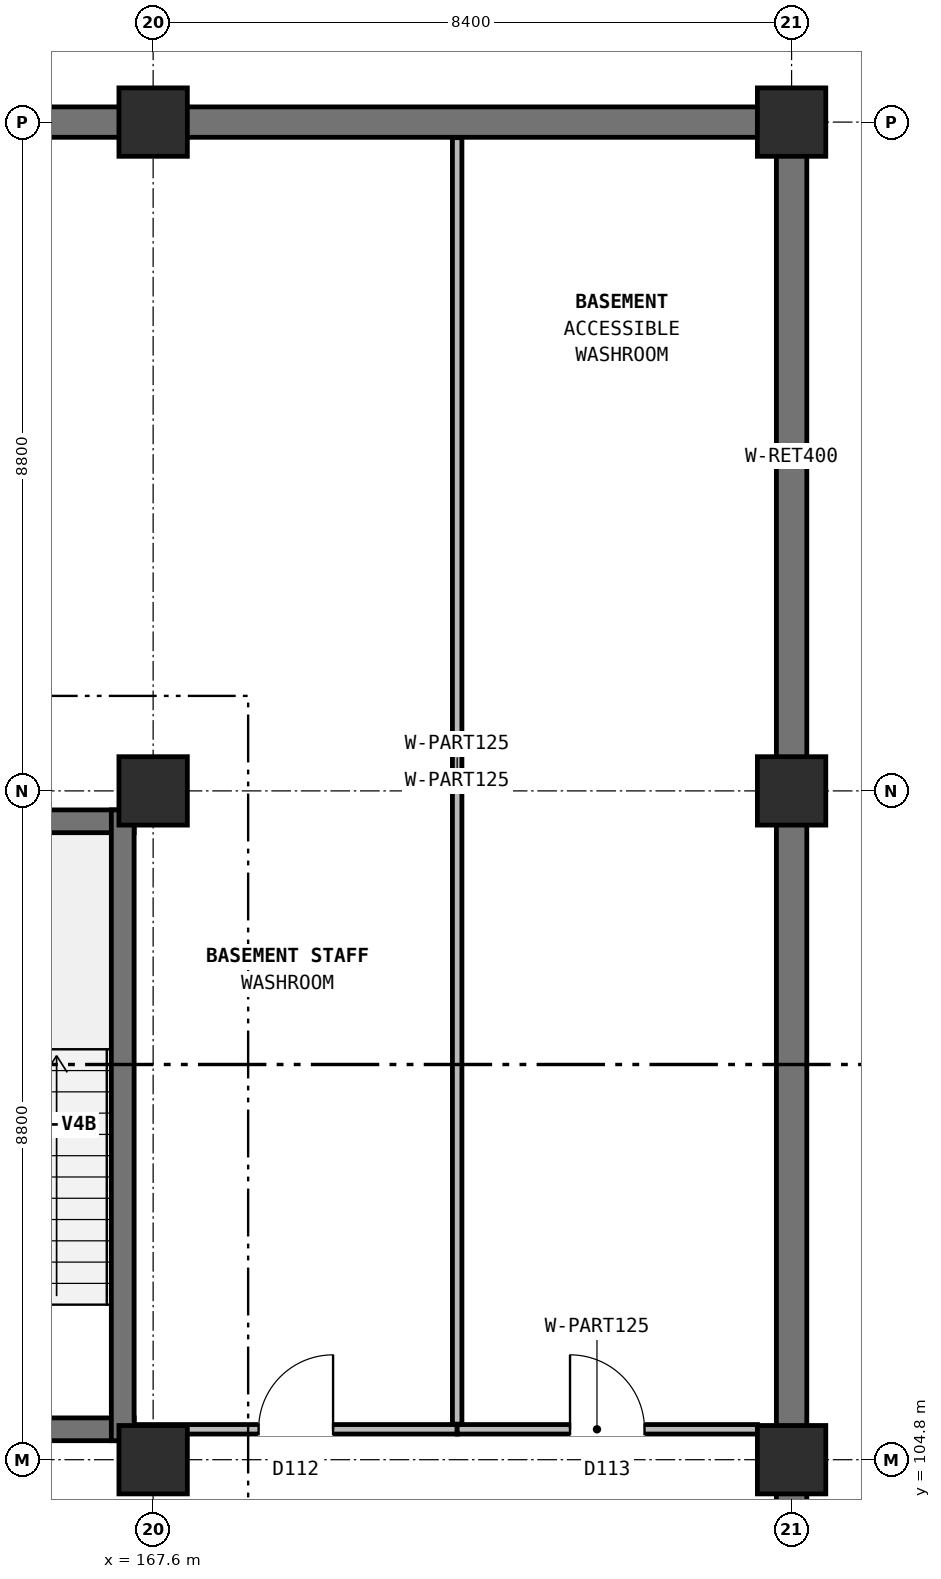
"""IFC4 building model, lengths in metres.
Left out: names, types, materials, properties, quantities, classifications, styles, units other than length and angle.
Written with IfcOpenShell. Run it as: python <this file> out.ifc"""

import sys

from ifc_helpers import new_model, si_unit, direction, frame, frame_2d, origin, origin_2d, place, context, subcontext, project, spatial, rectangle, extrude, element, fill, save


model = new_model("IFC4")
c1 = context("Model", 3, precision=1e-05, world=origin(), true_north=direction((0.0, 1.0)))
c2 = subcontext(c1, "Body", "Model", "MODEL_VIEW")
j1 = project(units=[si_unit("LENGTHUNIT", "METRE"), si_unit("PLANEANGLEUNIT", "RADIAN")], contexts=[c1])
p1 = place(None, origin())
s1 = spatial("IfcSite", under=j1, at=p1, CompositionType="ELEMENT")
p2 = place(p1, origin())
s2 = spatial("IfcBuilding", under=s1, at=p2, CompositionType="ELEMENT")
p3 = place(p2, frame((0.0, 0.0, -4.5)))
s3 = spatial("IfcBuildingStorey", under=s2, at=p3, CompositionType="ELEMENT", Elevation=-4.5)
for number, where, z_axis, x_axis in (
    (1, (167.6, 104.8, 0.0), (0.0, 0.0, 1.0), (1.0, 0.0, 0.0)),
    (2, (167.6, 113.6, 0.0), (0.0, 0.0, 1.0), (1.0, 0.0, 0.0)),
    (3, (167.6, 122.4, 0.0), (0.0, 0.0, 1.0), (1.0, 0.0, 0.0)),
    (4, (176.0, 104.8, 0.0), (0.0, 0.0, 1.0), (1.0, 0.0, 0.0)),
    (5, (176.0, 113.6, 0.0), (0.0, 0.0, 1.0), (1.0, 0.0, 0.0)),
    (6, (176.0, 122.4, 0.0), (0.0, 0.0, 1.0), (1.0, 0.0, 0.0)),
):
    element("IfcColumn", number, at=place(p3, frame(where, z_axis=z_axis, x_axis=x_axis)), inside=s3, PredefinedType="COLUMN", context=c2, shape_type="SweptSolid", body=[
        extrude(rectangle(XDim=0.9, YDim=0.9, at=origin_2d()), origin(), (0.0, 0.0, 1.0), 4.5),
    ])
p4 = place(p3, frame((176.0, 87.0, 0.0), z_axis=(0.0, 0.0, 1.0), x_axis=(0.0, 1.0, 0.0)))
e7 = element("IfcWall", 7, at=p4, inside=s3, PredefinedType="USERDEFINED", context=c2, shape_type="SweptSolid", body=[
    extrude(rectangle(XDim=35.6, YDim=0.4, at=frame_2d((17.8, 0.0))), origin(), (0.0, 0.0, 1.0), 4.5),
])
p5 = place(p3, frame((176.2, 122.4, 0.0), z_axis=(0.0, 0.0, 1.0), x_axis=(-1.0, 0.0, 0.0)))
e8 = element("IfcWall", 8, at=p5, inside=s3, PredefinedType="USERDEFINED", context=c2, shape_type="SweptSolid", body=[
    extrude(rectangle(XDim=168.4, YDim=0.4, at=frame_2d((84.2, 0.0))), origin(), (0.0, 0.0, 1.0), 4.5),
])
p6 = place(p3, frame((163.75, 105.2, 0.0), z_axis=(0.0, 0.0, 1.0), x_axis=(1.0, 0.0, 0.0)))
e9 = element("IfcWall", 9, at=p6, inside=s3, PredefinedType="SHEAR", context=c2, shape_type="SweptSolid", body=[
    extrude(rectangle(XDim=3.6, YDim=0.3, at=frame_2d((1.8, 0.0))), origin(), (0.0, 0.0, 1.0), 4.5),
])
p7 = place(p6, frame((1.05, 0.0, 0.0)))
e10 = element("IfcOpeningElement", 10, at=p7, cuts=e9, PredefinedType="OPENING", context=c2, shape_type="SweptSolid", body=[
    extrude(rectangle(XDim=1.1, YDim=2.2, at=frame_2d((0.55, 1.1))), frame((0.0, 0.16, 0.0), z_axis=(0.0, -1.0, 0.0), x_axis=(1.0, 0.0, 0.0)), (0.0, 0.0, 1.0), 0.32),
])
p8 = place(p3, frame((163.75, 113.2, 0.0), z_axis=(0.0, 0.0, 1.0), x_axis=(1.0, 0.0, 0.0)))
e11 = element("IfcWall", 11, at=p8, inside=s3, PredefinedType="SHEAR", context=c2, shape_type="SweptSolid", body=[
    extrude(rectangle(XDim=3.6, YDim=0.3, at=frame_2d((1.8, 0.0))), origin(), (0.0, 0.0, 1.0), 4.5),
])
p9 = place(p3, frame((167.2, 105.05, 0.0), z_axis=(0.0, 0.0, 1.0), x_axis=(0.0, 1.0, 0.0)))
e12 = element("IfcWall", 12, at=p9, inside=s3, PredefinedType="SHEAR", context=c2, shape_type="SweptSolid", body=[
    extrude(rectangle(XDim=8.3, YDim=0.3, at=frame_2d((4.15, 0.0))), origin(), (0.0, 0.0, 1.0), 4.5),
])
p10 = place(p3, frame((167.355, 105.2, 0.0), z_axis=(0.0, 0.0, 1.0), x_axis=(1.0, 0.0, 0.0)))
e13 = element("IfcWall", 13, at=p10, inside=s3, PredefinedType="PARTITIONING", context=c2, shape_type="SweptSolid", body=[
    extrude(rectangle(XDim=4.245, YDim=0.125, at=frame_2d((2.123, 0.0))), origin(), (0.0, 0.0, 1.0), 3.745),
])
p11 = place(p10, frame((1.633, 0.0, 0.0)))
e14 = element("IfcOpeningElement", 14, at=p11, cuts=e13, PredefinedType="OPENING", context=c2, shape_type="SweptSolid", body=[
    extrude(rectangle(XDim=0.98, YDim=2.1, at=frame_2d((0.49, 1.05))), frame((0.0, 0.073, 0.0), z_axis=(0.0, -1.0, 0.0), x_axis=(1.0, 0.0, 0.0)), (0.0, 0.0, 1.0), 0.145),
])
p12 = place(p3, frame((171.6, 105.2, 0.0), z_axis=(0.0, 0.0, 1.0), x_axis=(1.0, 0.0, 0.0)))
e15 = element("IfcWall", 15, at=p12, inside=s3, PredefinedType="PARTITIONING", context=c2, shape_type="SweptSolid", body=[
    extrude(rectangle(XDim=3.95, YDim=0.125, at=frame_2d((1.975, 0.0))), origin(), (0.0, 0.0, 1.0), 3.745),
])
p13 = place(p12, frame((1.485, 0.0, 0.0)))
e16 = element("IfcOpeningElement", 16, at=p13, cuts=e15, PredefinedType="OPENING", context=c2, shape_type="SweptSolid", body=[
    extrude(rectangle(XDim=0.98, YDim=2.1, at=frame_2d((0.49, 1.05))), frame((0.0, 0.073, 0.0), z_axis=(0.0, -1.0, 0.0), x_axis=(1.0, 0.0, 0.0)), (0.0, 0.0, 1.0), 0.145),
])
p14 = place(p3, frame((171.6, 105.268, 0.0), z_axis=(0.0, 0.0, 1.0), x_axis=(0.0, 1.0, 0.0)))
e17 = element("IfcWall", 17, at=p14, inside=s3, PredefinedType="PARTITIONING", context=c2, shape_type="SweptSolid", body=[
    extrude(rectangle(XDim=16.927, YDim=0.125, at=frame_2d((8.464, 0.0))), origin(), (0.0, 0.0, 1.0), 4.165),
])
p15 = place(p11, origin())
e18 = element("IfcDoor", 18, at=p15, inside=s3, OperationType="SINGLE_SWING_RIGHT", PredefinedType="DOOR", context=c2, shape_type="SweptSolid", body=[
    extrude(rectangle(XDim=0.98, YDim=2.1, at=frame_2d((0.49, 1.05))), frame((0.0, 0.025, 0.0), z_axis=(0.0, -1.0, 0.0), x_axis=(1.0, 0.0, 0.0)), (0.0, 0.0, 1.0), 0.05),
])
fill(e14, e18)
p16 = place(p13, origin())
e19 = element("IfcDoor", 19, at=p16, inside=s3, OperationType="SINGLE_SWING_LEFT", PredefinedType="DOOR", context=c2, shape_type="SweptSolid", body=[
    extrude(rectangle(XDim=0.98, YDim=2.1, at=frame_2d((0.49, 1.05))), frame((0.0, 0.025, 0.0), z_axis=(0.0, -1.0, 0.0), x_axis=(1.0, 0.0, 0.0)), (0.0, 0.0, 1.0), 0.05),
])
fill(e16, e19)
save(model, sys.argv[1])
